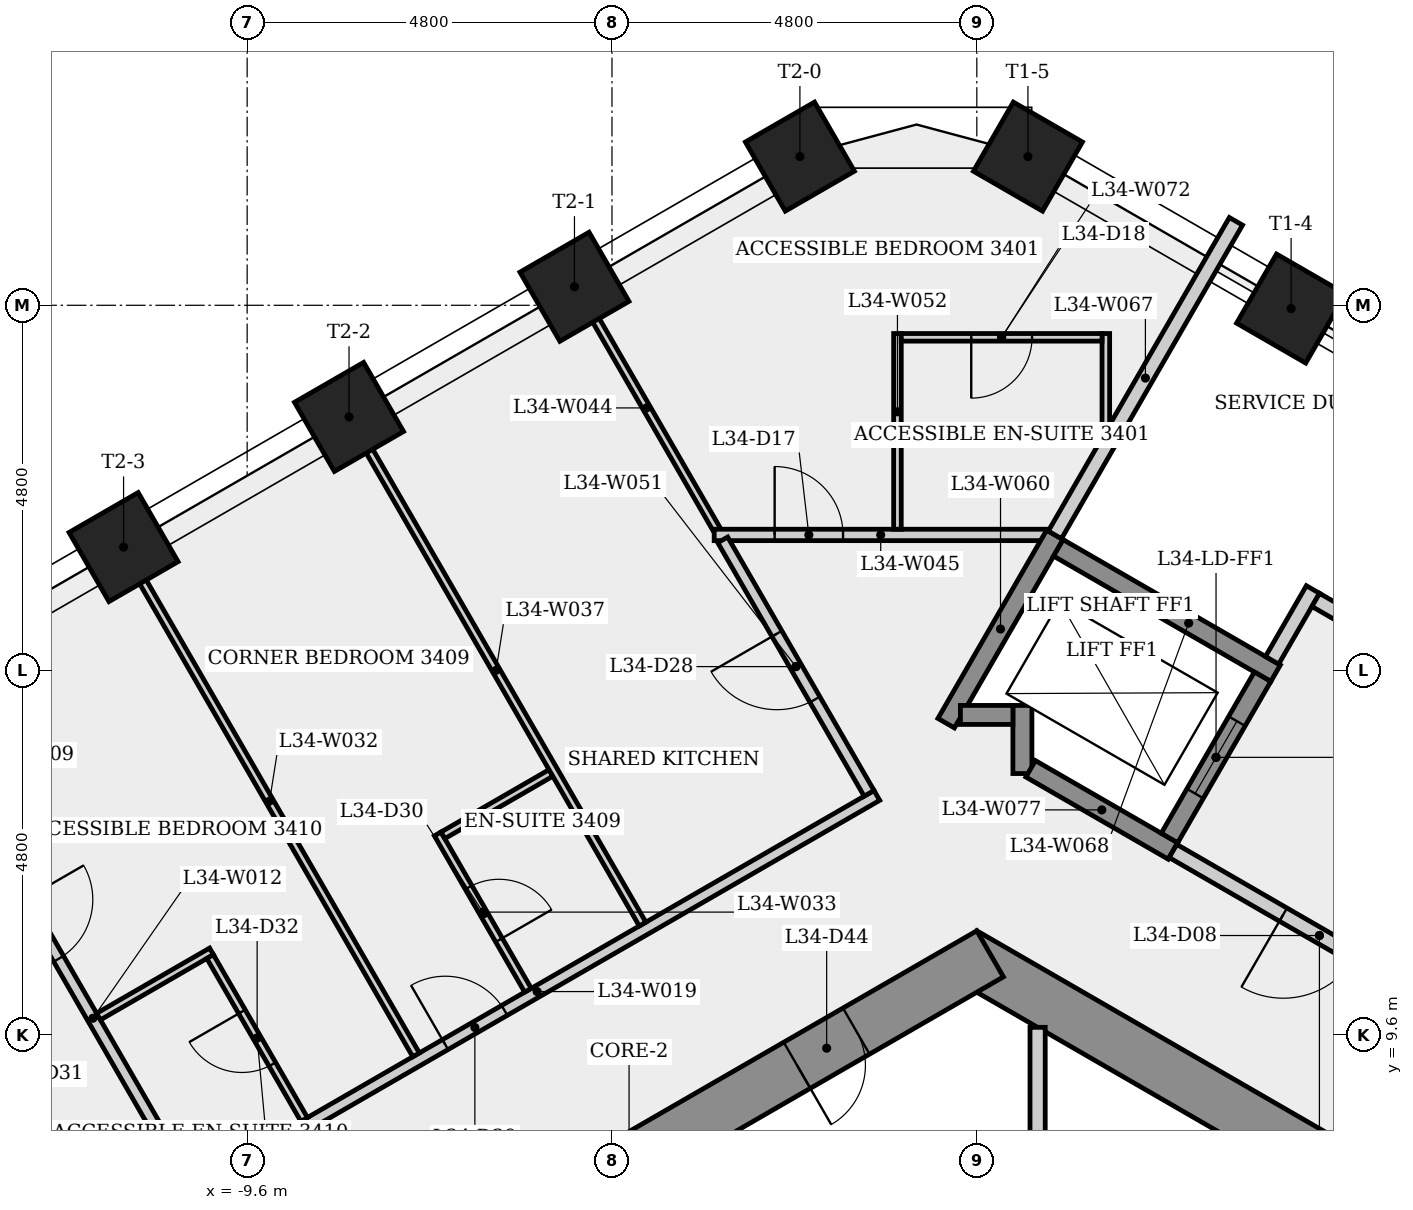
"""IFC4 building model, lengths in metres.
Left out: names, types, materials, properties, quantities, classifications, styles, units other than length and angle.
Written with IfcOpenShell. Run it as: python <this file> out.ifc"""

import sys

from ifc_helpers import new_model, si_unit, direction, frame, frame_2d, origin, origin_2d, place, context, subcontext, project, spatial, rectangle, extrude, element, fill, save


model = new_model("IFC4")
c1 = context("Model", 3, precision=1e-05, world=origin(), true_north=direction((0.0, 1.0)))
c2 = subcontext(c1, "Body", "Model", "MODEL_VIEW")
j1 = project(units=[si_unit("LENGTHUNIT", "METRE"), si_unit("PLANEANGLEUNIT", "RADIAN")], contexts=[c1])
p1 = place(None, origin())
s1 = spatial("IfcSite", under=j1, at=p1, CompositionType="ELEMENT")
p2 = place(p1, origin())
s2 = spatial("IfcBuilding", under=s1, at=p2, CompositionType="ELEMENT")
p3 = place(p2, frame((0.0, 0.0, 128.5)))
s3 = spatial("IfcBuildingStorey", under=s2, at=p3, CompositionType="ELEMENT", Elevation=128.5)
p4 = place(p3, frame((9.325, 5.182, 0.0), z_axis=(0.0, 0.0, 1.0), x_axis=(-0.866023993627, 0.500002442456, 0.0)))
e1 = element("IfcWall", 1, at=p4, inside=s3, PredefinedType="SHEAR", context=c2, shape_type="SweptSolid", body=[
    extrude(rectangle(XDim=10.97, YDim=0.7, at=frame_2d((5.485, 0.0))), origin(), (0.0, 0.0, 1.0), 4.0),
])
p5 = place(p4, frame((2.933, 0.0, 0.0)))
e2 = element("IfcOpeningElement", 2, at=p5, cuts=e1, PredefinedType="OPENING", context=c2, shape_type="SweptSolid", body=[
    extrude(rectangle(XDim=0.9, YDim=2.1, at=frame_2d((0.45, 1.05))), frame((0.0, 0.36, 0.0), z_axis=(0.0, -1.0, 0.0), x_axis=(1.0, 0.0, 0.0)), (0.0, 0.0, 1.0), 0.72),
])
p6 = place(p3, frame((0.175, 10.667, 0.0), z_axis=(0.0, 0.0, 1.0), x_axis=(-0.866023993627, -0.500002442456, 0.0)))
e3 = element("IfcWall", 3, at=p6, inside=s3, PredefinedType="SHEAR", context=c2, shape_type="SweptSolid", body=[
    extrude(rectangle(XDim=10.97, YDim=0.7, at=frame_2d((5.485, 0.0))), origin(), (0.0, 0.0, 1.0), 4.0),
])
p7 = place(p6, frame((9.254, 0.0, 0.0)))
e4 = element("IfcOpeningElement", 4, at=p7, cuts=e3, PredefinedType="OPENING", context=c2, shape_type="SweptSolid", body=[
    extrude(rectangle(XDim=0.9, YDim=2.1, at=frame_2d((0.45, 1.05))), frame((0.0, 0.36, 0.0), z_axis=(0.0, -1.0, 0.0), x_axis=(1.0, 0.0, 0.0)), (0.0, 0.0, 1.0), 0.72),
])
p8 = place(p6, frame((2.033, 0.0, 0.0)))
e5 = element("IfcOpeningElement", 5, at=p8, cuts=e3, PredefinedType="OPENING", context=c2, shape_type="SweptSolid", body=[
    extrude(rectangle(XDim=0.9, YDim=2.1, at=frame_2d((0.45, 1.05))), frame((0.0, 0.36, 0.0), z_axis=(0.0, -1.0, 0.0), x_axis=(1.0, 0.0, 0.0)), (0.0, 0.0, 1.0), 0.72),
])
for number, where, z_axis, x_axis in (
    (6, (4.135, 19.157, 0.0), (0.0, 0.0, 1.0), (0.5, 0.866, 0.0)),
    (7, (0.673, 21.156, 0.0), (0.0, 0.0, 1.0), (0.5, 0.866, 0.0)),
    (8, (-2.327, 21.156, 0.0), (0.0, 0.0, 1.0), (-0.5, 0.866, 0.0)),
    (9, (-5.293, 19.444, 0.0), (0.0, 0.0, 1.0), (-0.5, 0.866, 0.0)),
    (10, (-8.26, 17.731, 0.0), (0.0, 0.0, 1.0), (-0.5, 0.866, 0.0)),
    (11, (-11.226, 16.019, 0.0), (0.0, 0.0, 1.0), (-0.5, 0.866, 0.0)),
):
    element("IfcColumn", number, at=place(p3, frame(where, z_axis=z_axis, x_axis=x_axis)), inside=s3, PredefinedType="COLUMN", context=c2, shape_type="SweptSolid", body=[
        extrude(rectangle(XDim=1.05, YDim=1.05, at=origin_2d()), origin(), (0.0, 0.0, 1.0), 4.0),
    ])
p9 = place(p3, frame((-12.976, 12.152, 0.0), z_axis=(0.0, 0.0, 1.0), x_axis=(0.500019321912, -0.866014247986, 0.0)))
e12 = element("IfcWall", 12, at=p9, inside=s3, PredefinedType="PARTITIONING", context=c2, shape_type="SweptSolid", body=[
    extrude(rectangle(XDim=5.386, YDim=0.15, at=frame_2d((2.693, 0.0))), origin(), (0.0, 0.0, 1.0), 3.65),
])
p10 = place(p9, frame((0.891, 0.0, 0.0)))
e13 = element("IfcOpeningElement", 13, at=p10, cuts=e12, PredefinedType="OPENING", context=c2, shape_type="SweptSolid", body=[
    extrude(rectangle(XDim=0.9, YDim=2.1, at=frame_2d((0.45, 1.05))), frame((0.0, 0.085, 0.0), z_axis=(0.0, -1.0, 0.0), x_axis=(1.0, 0.0, 0.0)), (0.0, 0.0, 1.0), 0.17),
])
p11 = place(p3, frame((-10.255, 7.589, 0.0), z_axis=(0.0, 0.0, 1.0), x_axis=(0.866015055687, 0.500017923002, 0.0)))
e14 = element("IfcWall", 14, at=p11, inside=s3, PredefinedType="PARTITIONING", context=c2, shape_type="SweptSolid", body=[
    extrude(rectangle(XDim=10.323, YDim=0.15, at=frame_2d((5.162, 0.0))), origin(), (0.0, 0.0, 1.0), 3.65),
])
p12 = place(p11, frame((3.766, 0.0, 0.0)))
e15 = element("IfcOpeningElement", 15, at=p12, cuts=e14, PredefinedType="OPENING", context=c2, shape_type="SweptSolid", body=[
    extrude(rectangle(XDim=0.9, YDim=2.1, at=frame_2d((0.45, 1.05))), frame((0.0, 0.085, 0.0), z_axis=(0.0, -1.0, 0.0), x_axis=(1.0, 0.0, 0.0)), (0.0, 0.0, 1.0), 0.17),
])
p13 = place(p3, frame((-10.069, 10.699, 0.0), z_axis=(0.0, 0.0, 1.0), x_axis=(-0.865984193376, -0.500071371729, 0.0)))
e16 = element("IfcWall", 16, at=p13, inside=s3, PredefinedType="PARTITIONING", context=c2, shape_type="SweptSolid", body=[
    extrude(rectangle(XDim=1.716, YDim=0.1, at=frame_2d((0.858, 0.0))), origin(), (0.0, 0.0, 1.0), 3.65),
])
p14 = place(p3, frame((-8.85, 8.487, 0.0), z_axis=(0.0, 0.0, 1.0), x_axis=(-0.500032699561, 0.866006523861, 0.0)))
e17 = element("IfcWall", 17, at=p14, inside=s3, PredefinedType="PARTITIONING", context=c2, shape_type="SweptSolid", body=[
    extrude(rectangle(XDim=2.475, YDim=0.1, at=frame_2d((1.237, 0.0))), origin(), (0.0, 0.0, 1.0), 3.65),
])
p15 = place(p14, frame((0.837, 0.0, 0.0)))
e18 = element("IfcOpeningElement", 18, at=p15, cuts=e17, PredefinedType="OPENING", context=c2, shape_type="SweptSolid", body=[
    extrude(rectangle(XDim=0.8, YDim=2.1, at=frame_2d((0.4, 1.05))), frame((0.0, 0.06, 0.0), z_axis=(0.0, -1.0, 0.0), x_axis=(1.0, 0.0, 0.0)), (0.0, 0.0, 1.0), 0.12),
])
p16 = place(p3, frame((-7.378, 9.337, 0.0), z_axis=(0.0, 0.0, 1.0), x_axis=(-0.499997453958, 0.866026873738, 0.0)))
e19 = element("IfcWall", 19, at=p16, inside=s3, PredefinedType="PARTITIONING", context=c2, shape_type="SweptSolid", body=[
    extrude(rectangle(XDim=7.71, YDim=0.1, at=frame_2d((3.855, 0.0))), origin(), (0.0, 0.0, 1.0), 3.65),
])
p17 = place(p3, frame((-7.093, 12.244, 0.0), z_axis=(0.0, 0.0, 1.0), x_axis=(0.500030943131, -0.866007538022, 0.0)))
e20 = element("IfcWall", 20, at=p17, inside=s3, PredefinedType="PARTITIONING", context=c2, shape_type="SweptSolid", body=[
    extrude(rectangle(XDim=2.375, YDim=0.1, at=frame_2d((1.188, 0.0))), origin(), (0.0, 0.0, 1.0), 3.65),
])
p18 = place(p17, frame((0.812, 0.0, 0.0)))
e21 = element("IfcOpeningElement", 21, at=p18, cuts=e20, PredefinedType="OPENING", context=c2, shape_type="SweptSolid", body=[
    extrude(rectangle(XDim=0.8, YDim=2.1, at=frame_2d((0.4, 1.05))), frame((0.0, 0.06, 0.0), z_axis=(0.0, -1.0, 0.0), x_axis=(1.0, 0.0, 0.0)), (0.0, 0.0, 1.0), 0.12),
])
p19 = place(p3, frame((-5.603, 13.046, 0.0), z_axis=(0.0, 0.0, 1.0), x_axis=(-0.866009679343, -0.500027234542, 0.0)))
e22 = element("IfcWall", 22, at=p19, inside=s3, PredefinedType="PARTITIONING", context=c2, shape_type="SweptSolid", body=[
    extrude(rectangle(XDim=1.641, YDim=0.1, at=frame_2d((0.821, 0.0))), origin(), (0.0, 0.0, 1.0), 3.65),
])
p20 = place(p3, frame((-8.253, 17.735, 0.0), z_axis=(0.0, 0.0, 1.0), x_axis=(0.499983743644, -0.866034789193, 0.0)))
e23 = element("IfcWall", 23, at=p20, inside=s3, PredefinedType="PARTITIONING", context=c2, shape_type="SweptSolid", body=[
    extrude(rectangle(XDim=7.711, YDim=0.1, at=frame_2d((3.855, 0.0))), origin(), (0.0, 0.0, 1.0), 3.65),
])
p21 = place(p3, frame((-3.418, 16.243, 0.0), z_axis=(0.0, 0.0, 1.0), x_axis=(-0.500060473882, 0.865990486357, 0.0)))
e24 = element("IfcWall", 24, at=p21, inside=s3, PredefinedType="PARTITIONING", context=c2, shape_type="SweptSolid", body=[
    extrude(rectangle(XDim=3.709, YDim=0.1, at=frame_2d((1.855, 0.0))), origin(), (0.0, 0.0, 1.0), 3.65),
])
p22 = place(p3, frame((-3.455, 16.178, 0.0), z_axis=(0.0, 0.0, 1.0), x_axis=(1.0, 0.0, 0.0)))
e25 = element("IfcWall", 25, at=p22, inside=s3, PredefinedType="PARTITIONING", context=c2, shape_type="SweptSolid", body=[
    extrude(rectangle(XDim=4.382, YDim=0.15, at=frame_2d((2.191, 0.0))), origin(), (0.0, 0.0, 1.0), 3.65),
])
p23 = place(p22, frame((0.795, 0.0, 0.0)))
e26 = element("IfcOpeningElement", 26, at=p23, cuts=e25, PredefinedType="OPENING", context=c2, shape_type="SweptSolid", body=[
    extrude(rectangle(XDim=0.9, YDim=2.1, at=frame_2d((0.45, 1.05))), frame((0.0, 0.085, 0.0), z_axis=(0.0, -1.0, 0.0), x_axis=(1.0, 0.0, 0.0)), (0.0, 0.0, 1.0), 0.17),
])
p24 = place(p3, frame((-1.417, 12.778, 0.0), z_axis=(0.0, 0.0, 1.0), x_axis=(-0.500018796845, 0.866014551149, 0.0)))
e27 = element("IfcWall", 27, at=p24, inside=s3, PredefinedType="PARTITIONING", context=c2, shape_type="SweptSolid", body=[
    extrude(rectangle(XDim=3.851, YDim=0.15, at=frame_2d((1.925, 0.0))), origin(), (0.0, 0.0, 1.0), 3.65),
])
p25 = place(p24, frame((1.426, 0.0, 0.0)))
e28 = element("IfcOpeningElement", 28, at=p25, cuts=e27, PredefinedType="OPENING", context=c2, shape_type="SweptSolid", body=[
    extrude(rectangle(XDim=1.0, YDim=2.1, at=frame_2d((0.5, 1.05))), frame((0.0, 0.085, 0.0), z_axis=(0.0, -1.0, 0.0), x_axis=(1.0, 0.0, 0.0)), (0.0, 0.0, 1.0), 0.17),
])
p26 = place(p3, frame((-1.044, 18.828, 0.0), z_axis=(0.0, 0.0, 1.0), x_axis=(0.0, -1.0, 0.0)))
e29 = element("IfcWall", 29, at=p26, inside=s3, PredefinedType="PARTITIONING", context=c2, shape_type="SweptSolid", body=[
    extrude(rectangle(XDim=2.575, YDim=0.1, at=frame_2d((1.288, 0.0))), origin(), (0.0, 0.0, 1.0), 3.65),
])
p27 = place(p3, frame((-0.403, 13.702, 0.0), z_axis=(0.0, 0.0, 1.0), x_axis=(0.499976111731, 0.866039195244, 0.0)))
e30 = element("IfcWall", 30, at=p27, inside=s3, PredefinedType="SHEAR", context=c2, shape_type="SweptSolid", body=[
    extrude(rectangle(XDim=2.861, YDim=0.25, at=frame_2d((1.43, 0.0))), origin(), (0.0, 0.0, 1.0), 3.65),
])
p28 = place(p3, frame((0.6, 13.039, 0.0), z_axis=(0.0, 0.0, 1.0), x_axis=(0.0, 1.0, 0.0)))
e31 = element("IfcWall", 31, at=p28, inside=s3, PredefinedType="SHEAR", context=c2, shape_type="SweptSolid", body=[
    extrude(rectangle(XDim=0.896, YDim=0.25, at=frame_2d((0.448, 0.0))), origin(), (0.0, 0.0, 1.0), 3.65),
])
p29 = place(p3, frame((0.475, 13.81, 0.0), z_axis=(0.0, 0.0, 1.0), x_axis=(-1.0, 0.0, 0.0)))
e32 = element("IfcWall", 32, at=p29, inside=s3, PredefinedType="SHEAR", context=c2, shape_type="SweptSolid", body=[
    extrude(rectangle(XDim=0.691, YDim=0.25, at=frame_2d((0.345, 0.0))), origin(), (0.0, 0.0, 1.0), 4.0),
])
p30 = place(p3, frame((0.8, 9.699, 0.0), z_axis=(0.0, 0.0, 1.0), x_axis=(0.0, -1.0, 0.0)))
e33 = element("IfcWall", 33, at=p30, inside=s3, PredefinedType="PARTITIONING", context=c2, shape_type="SweptSolid", body=[
    extrude(rectangle(XDim=4.425, YDim=0.2, at=frame_2d((2.212, 0.0))), origin(), (0.0, 0.0, 1.0), 3.65),
])
p31 = place(p3, frame((1.027, 16.179, 0.0), z_axis=(0.0, 0.0, 1.0), x_axis=(0.499991561973, 0.866030275427, 0.0)))
e34 = element("IfcWall", 34, at=p31, inside=s3, PredefinedType="PLUMBINGWALL", context=c2, shape_type="SweptSolid", body=[
    extrude(rectangle(XDim=4.764, YDim=0.2, at=frame_2d((2.382, 0.0))), origin(), (0.0, 0.0, 1.0), 3.65),
])
p32 = place(p3, frame((1.073, 16.008, 0.0), z_axis=(0.0, 0.0, 1.0), x_axis=(0.866040211805, -0.499974350878, 0.0)))
e35 = element("IfcWall", 35, at=p32, inside=s3, PredefinedType="SHEAR", context=c2, shape_type="SweptSolid", body=[
    extrude(rectangle(XDim=3.3, YDim=0.25, at=frame_2d((1.65, 0.0))), origin(), (0.0, 0.0, 1.0), 3.65),
])
p33 = place(p3, frame((1.698, 17.44, 0.0), z_axis=(0.0, 0.0, 1.0), x_axis=(0.0, 1.0, 0.0)))
e36 = element("IfcWall", 36, at=p33, inside=s3, PredefinedType="PARTITIONING", context=c2, shape_type="SweptSolid", body=[
    extrude(rectangle(XDim=1.388, YDim=0.1, at=frame_2d((0.694, 0.0))), origin(), (0.0, 0.0, 1.0), 3.65),
])
p34 = place(p3, frame((1.648, 18.778, 0.0), z_axis=(0.0, 0.0, 1.0), x_axis=(-1.0, 0.0, 0.0)))
e37 = element("IfcWall", 37, at=p34, inside=s3, PredefinedType="PARTITIONING", context=c2, shape_type="SweptSolid", body=[
    extrude(rectangle(XDim=2.642, YDim=0.1, at=frame_2d((1.321, 0.0))), origin(), (0.0, 0.0, 1.0), 3.65),
])
p35 = place(p34, frame((0.921, 0.0, 0.0)))
e38 = element("IfcOpeningElement", 38, at=p35, cuts=e37, PredefinedType="OPENING", context=c2, shape_type="SweptSolid", body=[
    extrude(rectangle(XDim=0.8, YDim=2.1, at=frame_2d((0.4, 1.05))), frame((0.0, 0.06, 0.0), z_axis=(0.0, -1.0, 0.0), x_axis=(1.0, 0.0, 0.0)), (0.0, 0.0, 1.0), 0.12),
])
p36 = place(p3, frame((2.581, 12.02, 0.0), z_axis=(0.0, 0.0, 1.0), x_axis=(-0.86603892542, 0.499976579108, 0.0)))
e39 = element("IfcWall", 39, at=p36, inside=s3, PredefinedType="SHEAR", context=c2, shape_type="SweptSolid", body=[
    extrude(rectangle(XDim=2.162, YDim=0.25, at=frame_2d((1.081, 0.0))), origin(), (0.0, 0.0, 1.0), 3.65),
])
p37 = place(p3, frame((2.535, 12.191, 0.0), z_axis=(0.0, 0.0, 1.0), x_axis=(0.500061746146, 0.865989751695, 0.0)))
e40 = element("IfcWall", 40, at=p37, inside=s3, PredefinedType="SHEAR", context=c2, shape_type="SweptSolid", body=[
    extrude(rectangle(XDim=2.45, YDim=0.25, at=frame_2d((1.225, 0.0))), origin(), (0.0, 0.0, 1.0), 4.0),
])
p38 = place(p37, frame((0.675, 0.0, 0.0)))
e41 = element("IfcOpeningElement", 41, at=p38, cuts=e40, PredefinedType="OPENING", context=c2, shape_type="SweptSolid", body=[
    extrude(rectangle(XDim=1.1, YDim=2.1, at=frame_2d((0.55, 1.05))), frame((0.0, 0.135, 0.0), z_axis=(0.0, -1.0, 0.0), x_axis=(1.0, 0.0, 0.0)), (0.0, 0.0, 1.0), 0.27),
])
p39 = place(p3, frame((3.885, 14.529, 0.0), z_axis=(0.0, 0.0, 1.0), x_axis=(0.499997628298, 0.866026773083, 0.0)))
e42 = element("IfcWall", 42, at=p39, inside=s3, PredefinedType="PLUMBINGWALL", context=c2, shape_type="SweptSolid", body=[
    extrude(rectangle(XDim=1.075, YDim=0.2, at=frame_2d((0.538, 0.0))), origin(), (0.0, 0.0, 1.0), 3.65),
])
p40 = place(p3, frame((4.459, 15.323, 0.0), z_axis=(0.0, 0.0, 1.0), x_axis=(0.866016039709, -0.500016218704, 0.0)))
e43 = element("IfcWall", 43, at=p40, inside=s3, PredefinedType="PLUMBINGWALL", context=c2, shape_type="SweptSolid", body=[
    extrude(rectangle(XDim=4.7, YDim=0.2, at=frame_2d((2.35, 0.0))), origin(), (0.0, 0.0, 1.0), 3.65),
])
p41 = place(p3, frame((6.435, 9.795, 0.0), z_axis=(0.0, 0.0, 1.0), x_axis=(-0.866012907634, 0.500021643343, 0.0)))
e44 = element("IfcWall", 44, at=p41, inside=s3, PredefinedType="PARTITIONING", context=c2, shape_type="SweptSolid", body=[
    extrude(rectangle(XDim=4.45, YDim=0.2, at=frame_2d((2.225, 0.0))), origin(), (0.0, 0.0, 1.0), 3.65),
])
p42 = place(p41, frame((1.675, 0.0, 0.0)))
e45 = element("IfcOpeningElement", 45, at=p42, cuts=e44, PredefinedType="OPENING", context=c2, shape_type="SweptSolid", body=[
    extrude(rectangle(XDim=1.1, YDim=2.1, at=frame_2d((0.55, 1.05))), frame((0.0, 0.11, 0.0), z_axis=(0.0, -1.0, 0.0), x_axis=(1.0, 0.0, 0.0)), (0.0, 0.0, 1.0), 0.22),
])
p43 = place(p42, origin())
e46 = element("IfcDoor", 46, at=p43, inside=s3, OperationType="SINGLE_SWING_RIGHT", PredefinedType="DOOR", context=c2, shape_type="SweptSolid", body=[
    extrude(rectangle(XDim=1.1, YDim=2.1, at=frame_2d((0.55, 1.05))), frame((0.0, 0.025, 0.0), z_axis=(0.0, -1.0, 0.0), x_axis=(1.0, 0.0, 0.0)), (0.0, 0.0, 1.0), 0.05),
])
fill(e45, e46)
p44 = place(p38, origin())
e47 = element("IfcDoor", 47, at=p44, inside=s3, OperationType="SLIDING_TO_LEFT", PredefinedType="DOOR", context=c2, shape_type="SweptSolid", body=[
    extrude(rectangle(XDim=1.1, YDim=2.1, at=frame_2d((0.55, 1.05))), frame((0.0, 0.025, 0.0), z_axis=(0.0, -1.0, 0.0), x_axis=(1.0, 0.0, 0.0)), (0.0, 0.0, 1.0), 0.05),
])
fill(e41, e47)
p45 = place(p23, origin())
e48 = element("IfcDoor", 48, at=p45, inside=s3, OperationType="SINGLE_SWING_LEFT", PredefinedType="DOOR", context=c2, shape_type="SweptSolid", body=[
    extrude(rectangle(XDim=0.9, YDim=2.1, at=frame_2d((0.45, 1.05))), frame((0.0, 0.025, 0.0), z_axis=(0.0, -1.0, 0.0), x_axis=(1.0, 0.0, 0.0)), (0.0, 0.0, 1.0), 0.05),
])
fill(e26, e48)
p46 = place(p35, origin())
e49 = element("IfcDoor", 49, at=p46, inside=s3, OperationType="SINGLE_SWING_RIGHT", PredefinedType="DOOR", context=c2, shape_type="SweptSolid", body=[
    extrude(rectangle(XDim=0.8, YDim=2.1, at=frame_2d((0.4, 1.05))), frame((0.0, 0.025, 0.0), z_axis=(0.0, -1.0, 0.0), x_axis=(1.0, 0.0, 0.0)), (0.0, 0.0, 1.0), 0.05),
])
fill(e38, e49)
p47 = place(p25, origin())
e50 = element("IfcDoor", 50, at=p47, inside=s3, OperationType="SINGLE_SWING_RIGHT", PredefinedType="DOOR", context=c2, shape_type="SweptSolid", body=[
    extrude(rectangle(XDim=1.0, YDim=2.1, at=frame_2d((0.5, 1.05))), frame((0.0, 0.025, 0.0), z_axis=(0.0, -1.0, 0.0), x_axis=(1.0, 0.0, 0.0)), (0.0, 0.0, 1.0), 0.05),
])
fill(e28, e50)
p48 = place(p12, origin())
e51 = element("IfcDoor", 51, at=p48, inside=s3, OperationType="SINGLE_SWING_LEFT", PredefinedType="DOOR", context=c2, shape_type="SweptSolid", body=[
    extrude(rectangle(XDim=0.9, YDim=2.1, at=frame_2d((0.45, 1.05))), frame((0.0, 0.025, 0.0), z_axis=(0.0, -1.0, 0.0), x_axis=(1.0, 0.0, 0.0)), (0.0, 0.0, 1.0), 0.05),
])
fill(e15, e51)
p49 = place(p18, origin())
e52 = element("IfcDoor", 52, at=p49, inside=s3, OperationType="SINGLE_SWING_RIGHT", PredefinedType="DOOR", context=c2, shape_type="SweptSolid", body=[
    extrude(rectangle(XDim=0.8, YDim=2.1, at=frame_2d((0.4, 1.05))), frame((0.0, 0.025, 0.0), z_axis=(0.0, -1.0, 0.0), x_axis=(1.0, 0.0, 0.0)), (0.0, 0.0, 1.0), 0.05),
])
fill(e21, e52)
p50 = place(p10, origin())
e53 = element("IfcDoor", 53, at=p50, inside=s3, OperationType="SINGLE_SWING_LEFT", PredefinedType="DOOR", context=c2, shape_type="SweptSolid", body=[
    extrude(rectangle(XDim=0.9, YDim=2.1, at=frame_2d((0.45, 1.05))), frame((0.0, 0.025, 0.0), z_axis=(0.0, -1.0, 0.0), x_axis=(1.0, 0.0, 0.0)), (0.0, 0.0, 1.0), 0.05),
])
fill(e13, e53)
p51 = place(p15, origin())
e54 = element("IfcDoor", 54, at=p51, inside=s3, OperationType="SINGLE_SWING_RIGHT", PredefinedType="DOOR", context=c2, shape_type="SweptSolid", body=[
    extrude(rectangle(XDim=0.8, YDim=2.1, at=frame_2d((0.4, 1.05))), frame((0.0, 0.025, 0.0), z_axis=(0.0, -1.0, 0.0), x_axis=(1.0, 0.0, 0.0)), (0.0, 0.0, 1.0), 0.05),
])
fill(e18, e54)
p52 = place(p8, origin())
e55 = element("IfcDoor", 55, at=p52, inside=s3, OperationType="SINGLE_SWING_RIGHT", PredefinedType="DOOR", context=c2, shape_type="SweptSolid", body=[
    extrude(rectangle(XDim=0.9, YDim=2.1, at=frame_2d((0.45, 1.05))), frame((0.0, 0.025, 0.0), z_axis=(0.0, -1.0, 0.0), x_axis=(1.0, 0.0, 0.0)), (0.0, 0.0, 1.0), 0.05),
])
fill(e5, e55)
save(model, sys.argv[1])
